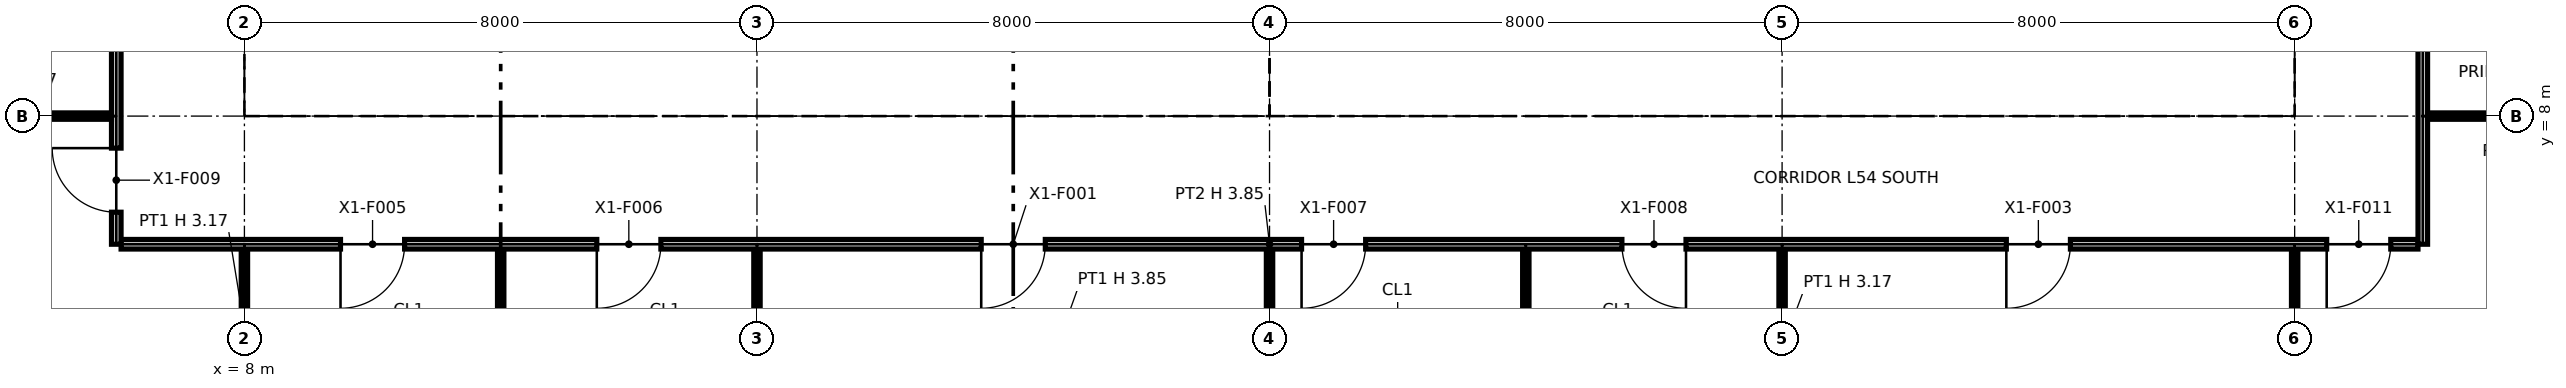
"""IFC4 building model, lengths in metres.
Left out: names, types, materials, properties, quantities, classifications, styles, units other than length and angle.
Written with IfcOpenShell. Run it as: python <this file> out.ifc"""

import sys

from ifc_helpers import new_model, si_unit, direction, frame, frame_2d, origin, origin_2d, place, context, subcontext, project, spatial, polyline, rectangle, i_section, outline, extrude, element, fill, save


model = new_model("IFC4")
c1 = context("Model", 3, precision=1e-05, world=origin(), true_north=direction((0.0, 1.0)))
c2 = subcontext(c1, "Body", "Model", "MODEL_VIEW")
j1 = project(units=[si_unit("LENGTHUNIT", "METRE"), si_unit("PLANEANGLEUNIT", "RADIAN")], contexts=[c1])
p1 = place(None, origin())
s1 = spatial("IfcSite", under=j1, at=p1, CompositionType="ELEMENT")
p2 = place(p1, origin())
s2 = spatial("IfcBuilding", under=s1, at=p2, CompositionType="ELEMENT")
p3 = place(p2, frame((0.0, 0.0, 251.0)))
s3 = spatial("IfcBuildingStorey", under=s2, at=p3, CompositionType="ELEMENT", Elevation=251.0)
for number, where, z_axis, x_axis in (
    (1, (8.0, 8.0, 0.0), (0.0, 0.0, 1.0), (1.0, 0.0, 0.0)),
    (2, (16.0, 8.0, 0.0), (0.0, 0.0, 1.0), (1.0, 0.0, 0.0)),
):
    element("IfcColumn", number, at=place(p3, frame(where, z_axis=z_axis, x_axis=x_axis)), inside=s3, PredefinedType="COLUMN", context=c2, shape_type="SweptSolid", body=[
        extrude(i_section(OverallWidth=0.371, OverallDepth=0.361, WebThickness=0.012, FlangeThickness=0.02, at=origin_2d()), origin(), (0.0, 0.0, 1.0), 3.85),
    ])
p4 = place(p3, frame((24.0, 8.0, 0.0), z_axis=(0.0, 0.0, 1.0), x_axis=(1.0, 0.0, 0.0)))
e3 = element("IfcColumn", 3, at=p4, inside=s3, PredefinedType="COLUMN", context=c2, shape_type="SweptSolid", body=[
    extrude(i_section(OverallWidth=0.373, OverallDepth=0.368, WebThickness=0.015, FlangeThickness=0.024, at=origin_2d()), origin(), (0.0, 0.0, 1.0), 3.85),
])
for number, where, z_axis, x_axis in (
    (4, (32.0, 8.0, 0.0), (0.0, 0.0, 1.0), (1.0, 0.0, 0.0)),
    (5, (40.0, 8.0, 0.0), (0.0, 0.0, 1.0), (1.0, 0.0, 0.0)),
):
    element("IfcColumn", number, at=place(p3, frame(where, z_axis=z_axis, x_axis=x_axis)), inside=s3, PredefinedType="COLUMN", context=c2, shape_type="SweptSolid", body=[
        extrude(i_section(OverallWidth=0.371, OverallDepth=0.361, WebThickness=0.012, FlangeThickness=0.02, at=origin_2d()), origin(), (0.0, 0.0, 1.0), 3.85),
    ])
p5 = place(p3, frame((8.65, 8.75, 0.0), z_axis=(0.0, 0.0, 1.0), x_axis=(1.0, 0.0, 0.0)))
e6 = element("IfcWall", 6, at=p5, inside=s3, PredefinedType="PARTITIONING", context=c2, shape_type="SweptSolid", body=[
    extrude(outline(polyline([(0.0, 0.0), (14.7, 0.0), (14.7, 3.85), (7.438, 3.85), (7.438, 3.308), (7.262, 3.308), (7.261, 3.85), (0.0, 3.85), (0.0, 0.0)])), frame((0.0, 0.1, 0.0), z_axis=(0.0, -1.0, 0.0), x_axis=(1.0, 0.0, 0.0)), (0.0, 0.0, 1.0), 0.2),
])
p6 = place(p5, frame((1.3, 0.0, 0.0)))
e7 = element("IfcOpeningElement", 7, at=p6, cuts=e6, PredefinedType="OPENING", context=c2, shape_type="SweptSolid", body=[
    extrude(rectangle(XDim=1.4, YDim=2.1, at=frame_2d((0.7, 1.05))), frame((0.0, 0.11, 0.0), z_axis=(0.0, -1.0, 0.0), x_axis=(1.0, 0.0, 0.0)), (0.0, 0.0, 1.0), 0.22),
])
p7 = place(p5, frame((4.6, 0.0, 0.0)))
e8 = element("IfcOpeningElement", 8, at=p7, cuts=e6, PredefinedType="OPENING", context=c2, shape_type="SweptSolid", body=[
    extrude(rectangle(XDim=1.4, YDim=2.1, at=frame_2d((0.7, 1.05))), frame((0.0, 0.11, 0.0), z_axis=(0.0, -1.0, 0.0), x_axis=(1.0, 0.0, 0.0)), (0.0, 0.0, 1.0), 0.22),
])
p8 = place(p5, frame((10.4, 0.0, 0.0)))
e9 = element("IfcOpeningElement", 9, at=p8, cuts=e6, PredefinedType="OPENING", context=c2, shape_type="SweptSolid", body=[
    extrude(rectangle(XDim=1.2, YDim=2.1, at=frame_2d((0.6, 1.05))), frame((0.0, 0.11, 0.0), z_axis=(0.0, -1.0, 0.0), x_axis=(1.0, 0.0, 0.0)), (0.0, 0.0, 1.0), 0.22),
])
p9 = place(p3, frame((8.75, 8.85, 0.0), z_axis=(0.0, 0.0, 1.0), x_axis=(0.0, 1.0, 0.0)))
e10 = element("IfcWall", 10, at=p9, inside=s3, PredefinedType="PARTITIONING", context=c2, shape_type="SweptSolid", body=[
    extrude(outline(polyline([(0.0, 0.0), (14.3, 0.0), (14.3, 3.85), (10.225, 3.85), (10.224, 3.44), (10.076, 3.44), (10.075, 3.85), (7.239, 3.85), (7.238, 3.308), (7.062, 3.308), (7.062, 3.85), (0.0, 3.85), (0.0, 0.0)])), frame((0.0, 0.1, 0.0), z_axis=(0.0, -1.0, 0.0), x_axis=(1.0, 0.0, 0.0)), (0.0, 0.0, 1.0), 0.2),
])
p10 = place(p9, frame((8.3, 0.0, 0.0)))
e11 = element("IfcOpeningElement", 11, at=p10, cuts=e10, PredefinedType="OPENING", context=c2, shape_type="SweptSolid", body=[
    extrude(rectangle(XDim=1.8, YDim=2.1, at=frame_2d((0.9, 1.05))), frame((0.0, 0.11, 0.0), z_axis=(0.0, -1.0, 0.0), x_axis=(1.0, 0.0, 0.0)), (0.0, 0.0, 1.0), 0.22),
])
p11 = place(p3, frame((12.4, 8.85, 0.0), z_axis=(0.0, 0.0, 1.0), x_axis=(0.0, 1.0, 0.0)))
e12 = element("IfcWall", 12, at=p11, inside=s3, PredefinedType="PARTITIONING", context=c2, shape_type="SweptSolid", body=[
    extrude(rectangle(XDim=6.85, YDim=0.2, at=frame_2d((3.425, 0.0))), origin(), (0.0, 0.0, 1.0), 3.85),
])
p12 = place(p3, frame((15.85, 8.85, 0.0), z_axis=(0.0, 0.0, 1.0), x_axis=(0.0, 1.0, 0.0)))
e13 = element("IfcWall", 13, at=p12, inside=s3, PredefinedType="PARTITIONING", context=c2, shape_type="SweptSolid", body=[
    extrude(rectangle(XDim=1.55, YDim=0.9, at=frame_2d((0.775, 0.0))), origin(), (0.0, 0.0, 1.0), 3.308),
])
p13 = place(p12, frame((0.3, 0.0, 0.0)))
e14 = element("IfcOpeningElement", 14, at=p13, cuts=e13, PredefinedType="OPENING", context=c2, shape_type="SweptSolid", body=[
    extrude(rectangle(XDim=1.1, YDim=2.1, at=frame_2d((0.55, 1.05))), frame((0.0, 0.46, 0.0), z_axis=(0.0, -1.0, 0.0), x_axis=(1.0, 0.0, 0.0)), (0.0, 0.0, 1.0), 0.92),
])
p14 = place(p3, frame((23.25, 8.85, 0.0), z_axis=(0.0, 0.0, 1.0), x_axis=(0.0, 1.0, 0.0)))
e15 = element("IfcWall", 15, at=p14, inside=s3, PredefinedType="PARTITIONING", context=c2, shape_type="SweptSolid", body=[
    extrude(outline(polyline([(0.0, 0.0), (14.3, 0.0), (14.3, 3.85), (10.225, 3.85), (10.224, 3.44), (10.076, 3.44), (10.075, 3.85), (7.239, 3.85), (7.238, 3.308), (7.062, 3.308), (7.062, 3.85), (5.225, 3.85), (5.224, 3.44), (5.076, 3.44), (5.075, 3.85), (0.0, 3.85), (0.0, 0.0)])), frame((0.0, 0.1, 0.0), z_axis=(0.0, -1.0, 0.0), x_axis=(1.0, 0.0, 0.0)), (0.0, 0.0, 1.0), 0.2),
])
p15 = place(p14, frame((8.3, 0.0, 0.0)))
e16 = element("IfcOpeningElement", 16, at=p15, cuts=e15, PredefinedType="OPENING", context=c2, shape_type="SweptSolid", body=[
    extrude(rectangle(XDim=1.8, YDim=2.1, at=frame_2d((0.9, 1.05))), frame((0.0, 0.11, 0.0), z_axis=(0.0, -1.0, 0.0), x_axis=(1.0, 0.0, 0.0)), (0.0, 0.0, 1.0), 0.22),
])
p16 = place(p3, frame((24.65, 8.75, 0.0), z_axis=(0.0, 0.0, 1.0), x_axis=(1.0, 0.0, 0.0)))
e17 = element("IfcWall", 17, at=p16, inside=s3, PredefinedType="PARTITIONING", context=c2, shape_type="SweptSolid", body=[
    extrude(outline(polyline([(0.0, 0.0), (14.7, 0.0), (14.7, 3.85), (7.438, 3.85), (7.438, 3.308), (7.262, 3.308), (7.261, 3.85), (0.0, 3.85), (0.0, 0.0)])), frame((0.0, 0.1, 0.0), z_axis=(0.0, -1.0, 0.0), x_axis=(1.0, 0.0, 0.0)), (0.0, 0.0, 1.0), 0.2),
])
p17 = place(p3, frame((24.75, 8.85, 0.0), z_axis=(0.0, 0.0, 1.0), x_axis=(0.0, 1.0, 0.0)))
e18 = element("IfcWall", 18, at=p17, inside=s3, PredefinedType="PARTITIONING", context=c2, shape_type="SweptSolid", body=[
    extrude(outline(polyline([(0.0, 0.0), (6.3, 0.0), (6.3, 3.85), (3.225, 3.85), (3.224, 3.44), (3.076, 3.44), (3.075, 3.85), (0.0, 3.85), (0.0, 0.0)])), frame((0.0, 0.1, 0.0), z_axis=(0.0, -1.0, 0.0), x_axis=(1.0, 0.0, 0.0)), (0.0, 0.0, 1.0), 0.2),
])
for number, where, z_axis, x_axis in (
    (19, (27.2, 8.85, 0.0), (0.0, 0.0, 1.0), (0.0, 1.0, 0.0)),
    (20, (29.5, 8.85, 0.0), (0.0, 0.0, 1.0), (0.0, 1.0, 0.0)),
):
    element("IfcWall", number, at=place(p3, frame(where, z_axis=z_axis, x_axis=x_axis)), inside=s3, PredefinedType="PARTITIONING", context=c2, shape_type="SweptSolid", body=[
        extrude(rectangle(XDim=2.55, YDim=0.2, at=frame_2d((1.275, 0.0))), origin(), (0.0, 0.0, 1.0), 3.85),
    ])
p18 = place(p3, frame((32.0, 8.85, 0.0), z_axis=(0.0, 0.0, 1.0), x_axis=(0.0, 1.0, 0.0)))
e21 = element("IfcWall", 21, at=p18, inside=s3, PredefinedType="PARTITIONING", context=c2, shape_type="SweptSolid", body=[
    extrude(rectangle(XDim=2.55, YDim=0.6, at=frame_2d((1.275, 0.0))), origin(), (0.0, 0.0, 1.0), 3.308),
])
for number, where, z_axis, x_axis in (
    (22, (35.6, 8.85, 0.0), (0.0, 0.0, 1.0), (0.0, 1.0, 0.0)),
    (23, (39.25, 8.85, 0.0), (0.0, 0.0, 1.0), (0.0, 1.0, 0.0)),
):
    element("IfcWall", number, at=place(p3, frame(where, z_axis=z_axis, x_axis=x_axis)), inside=s3, PredefinedType="PARTITIONING", context=c2, shape_type="SweptSolid", body=[
        extrude(rectangle(XDim=6.3, YDim=0.2, at=frame_2d((3.15, 0.0))), origin(), (0.0, 0.0, 1.0), 3.85),
    ])
p19 = place(p3, frame((40.0, 1.5, 0.0), z_axis=(0.0, 0.0, 1.0), x_axis=(0.0, 1.0, 0.0)))
e24 = element("IfcWall", 24, at=p19, inside=s3, PredefinedType="PARTITIONING", context=c2, shape_type="SweptSolid", body=[
    extrude(rectangle(XDim=4.425, YDim=0.1, at=frame_2d((2.212, 0.0))), origin(), (0.0, 0.0, 1.0), 3.172),
])
for number, where, z_axis, x_axis in (
    (25, (12.0, 2.83, 0.0), (0.0, 0.0, 1.0), (0.0, 1.0, 0.0)),
    (26, (16.0, 2.83, 0.0), (0.0, 0.0, 1.0), (0.0, 1.0, 0.0)),
    (27, (24.0, 2.83, 0.0), (0.0, 0.0, 1.0), (0.0, 1.0, 0.0)),
    (28, (28.0, 2.83, 0.0), (0.0, 0.0, 1.0), (0.0, 1.0, 0.0)),
    (29, (32.0, 2.83, 0.0), (0.0, 0.0, 1.0), (0.0, 1.0, 0.0)),
):
    element("IfcWall", number, at=place(p3, frame(where, z_axis=z_axis, x_axis=x_axis)), inside=s3, PredefinedType="PARTITIONING", context=c2, shape_type="SweptSolid", body=[
        extrude(rectangle(XDim=3.095, YDim=0.1, at=frame_2d((1.547, 0.0))), origin(), (0.0, 0.0, 1.0), 3.172),
    ])
p20 = place(p3, frame((8.0, 3.5, 0.0), z_axis=(0.0, 0.0, 1.0), x_axis=(0.0, 1.0, 0.0)))
e30 = element("IfcWall", 30, at=p20, inside=s3, PredefinedType="PARTITIONING", context=c2, shape_type="SweptSolid", body=[
    extrude(rectangle(XDim=2.425, YDim=0.1, at=frame_2d((1.212, 0.0))), origin(), (0.0, 0.0, 1.0), 3.172),
])
p21 = place(p3, frame((6.075, 6.0, 0.0), z_axis=(0.0, 0.0, 1.0), x_axis=(1.0, 0.0, 0.0)))
e31 = element("IfcWall", 31, at=p21, inside=s3, PredefinedType="PARTITIONING", context=c2, shape_type="SweptSolid", body=[
    extrude(rectangle(XDim=35.85, YDim=0.15, at=frame_2d((17.925, 0.0))), origin(), (0.0, 0.0, 1.0), 3.85),
])
p22 = place(p21, frame((14.425, 0.0, 0.0), z_axis=(0.0, 0.0, 1.0), x_axis=(-1.0, 0.0, 0.0)))
e32 = element("IfcOpeningElement", 32, at=p22, cuts=e31, PredefinedType="OPENING", context=c2, shape_type="SweptSolid", body=[
    extrude(rectangle(XDim=1.0, YDim=2.1, at=frame_2d((0.5, 1.05))), frame((0.0, 0.085, 0.0), z_axis=(0.0, -1.0, 0.0), x_axis=(1.0, 0.0, 0.0)), (0.0, 0.0, 1.0), 0.17),
])
p23 = place(p21, frame((30.425, 0.0, 0.0), z_axis=(0.0, 0.0, 1.0), x_axis=(-1.0, 0.0, 0.0)))
e33 = element("IfcOpeningElement", 33, at=p23, cuts=e31, PredefinedType="OPENING", context=c2, shape_type="SweptSolid", body=[
    extrude(rectangle(XDim=1.0, YDim=2.1, at=frame_2d((0.5, 1.05))), frame((0.0, 0.085, 0.0), z_axis=(0.0, -1.0, 0.0), x_axis=(1.0, 0.0, 0.0)), (0.0, 0.0, 1.0), 0.17),
])
p24 = place(p21, frame((4.425, 0.0, 0.0), z_axis=(0.0, 0.0, 1.0), x_axis=(-1.0, 0.0, 0.0)))
e34 = element("IfcOpeningElement", 34, at=p24, cuts=e31, PredefinedType="OPENING", context=c2, shape_type="SweptSolid", body=[
    extrude(rectangle(XDim=1.0, YDim=2.1, at=frame_2d((0.5, 1.05))), frame((0.0, 0.085, 0.0), z_axis=(0.0, -1.0, 0.0), x_axis=(1.0, 0.0, 0.0)), (0.0, 0.0, 1.0), 0.17),
])
p25 = place(p21, frame((8.425, 0.0, 0.0), z_axis=(0.0, 0.0, 1.0), x_axis=(-1.0, 0.0, 0.0)))
e35 = element("IfcOpeningElement", 35, at=p25, cuts=e31, PredefinedType="OPENING", context=c2, shape_type="SweptSolid", body=[
    extrude(rectangle(XDim=1.0, YDim=2.1, at=frame_2d((0.5, 1.05))), frame((0.0, 0.085, 0.0), z_axis=(0.0, -1.0, 0.0), x_axis=(1.0, 0.0, 0.0)), (0.0, 0.0, 1.0), 0.17),
])
p26 = place(p21, frame((19.425, 0.0, 0.0), z_axis=(0.0, 0.0, 1.0), x_axis=(-1.0, 0.0, 0.0)))
e36 = element("IfcOpeningElement", 36, at=p26, cuts=e31, PredefinedType="OPENING", context=c2, shape_type="SweptSolid", body=[
    extrude(rectangle(XDim=1.0, YDim=2.1, at=frame_2d((0.5, 1.05))), frame((0.0, 0.085, 0.0), z_axis=(0.0, -1.0, 0.0), x_axis=(1.0, 0.0, 0.0)), (0.0, 0.0, 1.0), 0.17),
])
p27 = place(p21, frame((24.425, 0.0, 0.0), z_axis=(0.0, 0.0, 1.0), x_axis=(-1.0, 0.0, 0.0)))
e37 = element("IfcOpeningElement", 37, at=p27, cuts=e31, PredefinedType="OPENING", context=c2, shape_type="SweptSolid", body=[
    extrude(rectangle(XDim=1.0, YDim=2.1, at=frame_2d((0.5, 1.05))), frame((0.0, 0.085, 0.0), z_axis=(0.0, -1.0, 0.0), x_axis=(1.0, 0.0, 0.0)), (0.0, 0.0, 1.0), 0.17),
])
p28 = place(p21, frame((35.425, 0.0, 0.0), z_axis=(0.0, 0.0, 1.0), x_axis=(-1.0, 0.0, 0.0)))
e38 = element("IfcOpeningElement", 38, at=p28, cuts=e31, PredefinedType="OPENING", context=c2, shape_type="SweptSolid", body=[
    extrude(rectangle(XDim=1.0, YDim=2.1, at=frame_2d((0.5, 1.05))), frame((0.0, 0.085, 0.0), z_axis=(0.0, -1.0, 0.0), x_axis=(1.0, 0.0, 0.0)), (0.0, 0.0, 1.0), 0.17),
])
p29 = place(p3, frame((6.0, 6.0, 0.0), z_axis=(0.0, 0.0, 1.0), x_axis=(0.0, 1.0, 0.0)))
e39 = element("IfcWall", 39, at=p29, inside=s3, PredefinedType="PARTITIONING", context=c2, shape_type="SweptSolid", body=[
    extrude(outline(polyline([(0.0, 0.0), (13.375, 0.0), (13.375, 3.85), (10.3, 3.85), (10.298, 3.172), (9.702, 3.172), (9.7, 3.85), (6.3, 3.85), (6.298, 3.172), (5.702, 3.172), (5.7, 3.85), (2.3, 3.85), (2.298, 3.172), (1.702, 3.172), (1.7, 3.85), (0.0, 3.85), (0.0, 0.0)])), frame((0.0, 0.075, 0.0), z_axis=(0.0, -1.0, 0.0), x_axis=(1.0, 0.0, 0.0)), (0.0, 0.0, 1.0), 0.15),
])
p30 = place(p29, frame((0.5, 0.0, 0.0)))
e40 = element("IfcOpeningElement", 40, at=p30, cuts=e39, PredefinedType="OPENING", context=c2, shape_type="SweptSolid", body=[
    extrude(rectangle(XDim=1.0, YDim=2.1, at=frame_2d((0.5, 1.05))), frame((0.0, 0.085, 0.0), z_axis=(0.0, -1.0, 0.0), x_axis=(1.0, 0.0, 0.0)), (0.0, 0.0, 1.0), 0.17),
])
p31 = place(p29, frame((3.5, 0.0, 0.0)))
e41 = element("IfcOpeningElement", 41, at=p31, cuts=e39, PredefinedType="OPENING", context=c2, shape_type="SweptSolid", body=[
    extrude(rectangle(XDim=1.0, YDim=2.1, at=frame_2d((0.5, 1.05))), frame((0.0, 0.085, 0.0), z_axis=(0.0, -1.0, 0.0), x_axis=(1.0, 0.0, 0.0)), (0.0, 0.0, 1.0), 0.17),
])
p32 = place(p29, frame((7.5, 0.0, 0.0)))
e42 = element("IfcOpeningElement", 42, at=p32, cuts=e39, PredefinedType="OPENING", context=c2, shape_type="SweptSolid", body=[
    extrude(rectangle(XDim=1.0, YDim=2.1, at=frame_2d((0.5, 1.05))), frame((0.0, 0.085, 0.0), z_axis=(0.0, -1.0, 0.0), x_axis=(1.0, 0.0, 0.0)), (0.0, 0.0, 1.0), 0.17),
])
p33 = place(p29, frame((11.225, 0.0, 0.0)))
e43 = element("IfcOpeningElement", 43, at=p33, cuts=e39, PredefinedType="OPENING", context=c2, shape_type="SweptSolid", body=[
    extrude(rectangle(XDim=1.0, YDim=2.1, at=frame_2d((0.5, 1.05))), frame((0.0, 0.085, 0.0), z_axis=(0.0, -1.0, 0.0), x_axis=(1.0, 0.0, 0.0)), (0.0, 0.0, 1.0), 0.17),
])
p34 = place(p3, frame((42.0, 6.0, 0.0), z_axis=(0.0, 0.0, 1.0), x_axis=(0.0, 1.0, 0.0)))
e44 = element("IfcWall", 44, at=p34, inside=s3, PredefinedType="PARTITIONING", context=c2, shape_type="SweptSolid", body=[
    extrude(outline(polyline([(0.0, 0.0), (11.925, 0.0), (11.925, 3.85), (10.3, 3.85), (10.298, 3.172), (9.702, 3.172), (9.7, 3.85), (6.3, 3.85), (6.298, 3.172), (5.702, 3.172), (5.7, 3.85), (2.3, 3.85), (2.298, 3.172), (1.702, 3.172), (1.7, 3.85), (0.0, 3.85), (0.0, 0.0)])), frame((0.0, 0.075, 0.0), z_axis=(0.0, -1.0, 0.0), x_axis=(1.0, 0.0, 0.0)), (0.0, 0.0, 1.0), 0.15),
])
p35 = place(p34, frame((4.5, 0.0, 0.0), z_axis=(0.0, 0.0, 1.0), x_axis=(-1.0, 0.0, 0.0)))
e45 = element("IfcOpeningElement", 45, at=p35, cuts=e44, PredefinedType="OPENING", context=c2, shape_type="SweptSolid", body=[
    extrude(rectangle(XDim=1.0, YDim=2.1, at=frame_2d((0.5, 1.05))), frame((0.0, 0.085, 0.0), z_axis=(0.0, -1.0, 0.0), x_axis=(1.0, 0.0, 0.0)), (0.0, 0.0, 1.0), 0.17),
])
p36 = place(p34, frame((8.5, 0.0, 0.0), z_axis=(0.0, 0.0, 1.0), x_axis=(-1.0, 0.0, 0.0)))
e46 = element("IfcOpeningElement", 46, at=p36, cuts=e44, PredefinedType="OPENING", context=c2, shape_type="SweptSolid", body=[
    extrude(rectangle(XDim=1.0, YDim=2.1, at=frame_2d((0.5, 1.05))), frame((0.0, 0.085, 0.0), z_axis=(0.0, -1.0, 0.0), x_axis=(1.0, 0.0, 0.0)), (0.0, 0.0, 1.0), 0.17),
])
p37 = place(p34, frame((11.5, 0.0, 0.0), z_axis=(0.0, 0.0, 1.0), x_axis=(-1.0, 0.0, 0.0)))
e47 = element("IfcOpeningElement", 47, at=p37, cuts=e44, PredefinedType="OPENING", context=c2, shape_type="SweptSolid", body=[
    extrude(rectangle(XDim=1.0, YDim=2.1, at=frame_2d((0.5, 1.05))), frame((0.0, 0.085, 0.0), z_axis=(0.0, -1.0, 0.0), x_axis=(1.0, 0.0, 0.0)), (0.0, 0.0, 1.0), 0.17),
])
for number, where, z_axis, x_axis in (
    (48, (2.83, 8.0, 0.0), (0.0, 0.0, 1.0), (1.0, 0.0, 0.0)),
    (49, (42.075, 8.0, 0.0), (0.0, 0.0, 1.0), (1.0, 0.0, 0.0)),
):
    element("IfcWall", number, at=place(p3, frame(where, z_axis=z_axis, x_axis=x_axis)), inside=s3, PredefinedType="PARTITIONING", context=c2, shape_type="SweptSolid", body=[
        extrude(rectangle(XDim=3.095, YDim=0.1, at=frame_2d((1.547, 0.0))), origin(), (0.0, 0.0, 1.0), 3.172),
    ])
p38 = place(p6, origin())
e50 = element("IfcDoor", 50, at=p38, inside=s3, OperationType="DOUBLE_DOOR_SINGLE_SWING", PredefinedType="NOTDEFINED", context=c2, shape_type="SweptSolid", body=[
    extrude(rectangle(XDim=1.4, YDim=2.1, at=frame_2d((0.7, 1.05))), frame((0.0, 0.025, 0.0), z_axis=(0.0, -1.0, 0.0), x_axis=(1.0, 0.0, 0.0)), (0.0, 0.0, 1.0), 0.05),
])
fill(e7, e50)
p39 = place(p7, origin())
e51 = element("IfcDoor", 51, at=p39, inside=s3, OperationType="DOUBLE_DOOR_SINGLE_SWING", PredefinedType="NOTDEFINED", context=c2, shape_type="SweptSolid", body=[
    extrude(rectangle(XDim=1.4, YDim=2.1, at=frame_2d((0.7, 1.05))), frame((0.0, 0.025, 0.0), z_axis=(0.0, -1.0, 0.0), x_axis=(1.0, 0.0, 0.0)), (0.0, 0.0, 1.0), 0.05),
])
fill(e8, e51)
p40 = place(p8, origin())
e52 = element("IfcDoor", 52, at=p40, inside=s3, OperationType="SINGLE_SWING_LEFT", PredefinedType="NOTDEFINED", context=c2, shape_type="SweptSolid", body=[
    extrude(rectangle(XDim=1.2, YDim=2.1, at=frame_2d((0.6, 1.05))), frame((0.0, 0.025, 0.0), z_axis=(0.0, -1.0, 0.0), x_axis=(1.0, 0.0, 0.0)), (0.0, 0.0, 1.0), 0.05),
])
fill(e9, e52)
p41 = place(p22, origin())
e53 = element("IfcDoor", 53, at=p41, inside=s3, OperationType="SINGLE_SWING_RIGHT", PredefinedType="DOOR", context=c2, shape_type="SweptSolid", body=[
    extrude(rectangle(XDim=1.0, YDim=2.1, at=frame_2d((0.5, 1.05))), frame((0.0, 0.025, 0.0), z_axis=(0.0, -1.0, 0.0), x_axis=(1.0, 0.0, 0.0)), (0.0, 0.0, 1.0), 0.05),
])
fill(e32, e53)
p42 = place(p23, origin())
e54 = element("IfcDoor", 54, at=p42, inside=s3, OperationType="SINGLE_SWING_RIGHT", PredefinedType="DOOR", context=c2, shape_type="SweptSolid", body=[
    extrude(rectangle(XDim=1.0, YDim=2.1, at=frame_2d((0.5, 1.05))), frame((0.0, 0.025, 0.0), z_axis=(0.0, -1.0, 0.0), x_axis=(1.0, 0.0, 0.0)), (0.0, 0.0, 1.0), 0.05),
])
fill(e33, e54)
p43 = place(p24, origin())
e55 = element("IfcDoor", 55, at=p43, inside=s3, OperationType="SINGLE_SWING_RIGHT", PredefinedType="DOOR", context=c2, shape_type="SweptSolid", body=[
    extrude(rectangle(XDim=1.0, YDim=2.1, at=frame_2d((0.5, 1.05))), frame((0.0, 0.025, 0.0), z_axis=(0.0, -1.0, 0.0), x_axis=(1.0, 0.0, 0.0)), (0.0, 0.0, 1.0), 0.05),
])
fill(e34, e55)
p44 = place(p25, origin())
e56 = element("IfcDoor", 56, at=p44, inside=s3, OperationType="SINGLE_SWING_RIGHT", PredefinedType="DOOR", context=c2, shape_type="SweptSolid", body=[
    extrude(rectangle(XDim=1.0, YDim=2.1, at=frame_2d((0.5, 1.05))), frame((0.0, 0.025, 0.0), z_axis=(0.0, -1.0, 0.0), x_axis=(1.0, 0.0, 0.0)), (0.0, 0.0, 1.0), 0.05),
])
fill(e35, e56)
p45 = place(p26, origin())
e57 = element("IfcDoor", 57, at=p45, inside=s3, OperationType="SINGLE_SWING_RIGHT", PredefinedType="DOOR", context=c2, shape_type="SweptSolid", body=[
    extrude(rectangle(XDim=1.0, YDim=2.1, at=frame_2d((0.5, 1.05))), frame((0.0, 0.025, 0.0), z_axis=(0.0, -1.0, 0.0), x_axis=(1.0, 0.0, 0.0)), (0.0, 0.0, 1.0), 0.05),
])
fill(e36, e57)
p46 = place(p27, origin())
e58 = element("IfcDoor", 58, at=p46, inside=s3, OperationType="SINGLE_SWING_LEFT", PredefinedType="DOOR", context=c2, shape_type="SweptSolid", body=[
    extrude(rectangle(XDim=1.0, YDim=2.1, at=frame_2d((0.5, 1.05))), frame((0.0, 0.025, 0.0), z_axis=(0.0, -1.0, 0.0), x_axis=(1.0, 0.0, 0.0)), (0.0, 0.0, 1.0), 0.05),
])
fill(e37, e58)
p47 = place(p30, origin())
e59 = element("IfcDoor", 59, at=p47, inside=s3, OperationType="SINGLE_SWING_RIGHT", PredefinedType="DOOR", context=c2, shape_type="SweptSolid", body=[
    extrude(rectangle(XDim=1.0, YDim=2.1, at=frame_2d((0.5, 1.05))), frame((0.0, 0.025, 0.0), z_axis=(0.0, -1.0, 0.0), x_axis=(1.0, 0.0, 0.0)), (0.0, 0.0, 1.0), 0.05),
])
fill(e40, e59)
p48 = place(p28, origin())
e60 = element("IfcDoor", 60, at=p48, inside=s3, OperationType="SINGLE_SWING_RIGHT", PredefinedType="DOOR", context=c2, shape_type="SweptSolid", body=[
    extrude(rectangle(XDim=1.0, YDim=2.1, at=frame_2d((0.5, 1.05))), frame((0.0, 0.025, 0.0), z_axis=(0.0, -1.0, 0.0), x_axis=(1.0, 0.0, 0.0)), (0.0, 0.0, 1.0), 0.05),
])
fill(e38, e60)
save(model, sys.argv[1])
